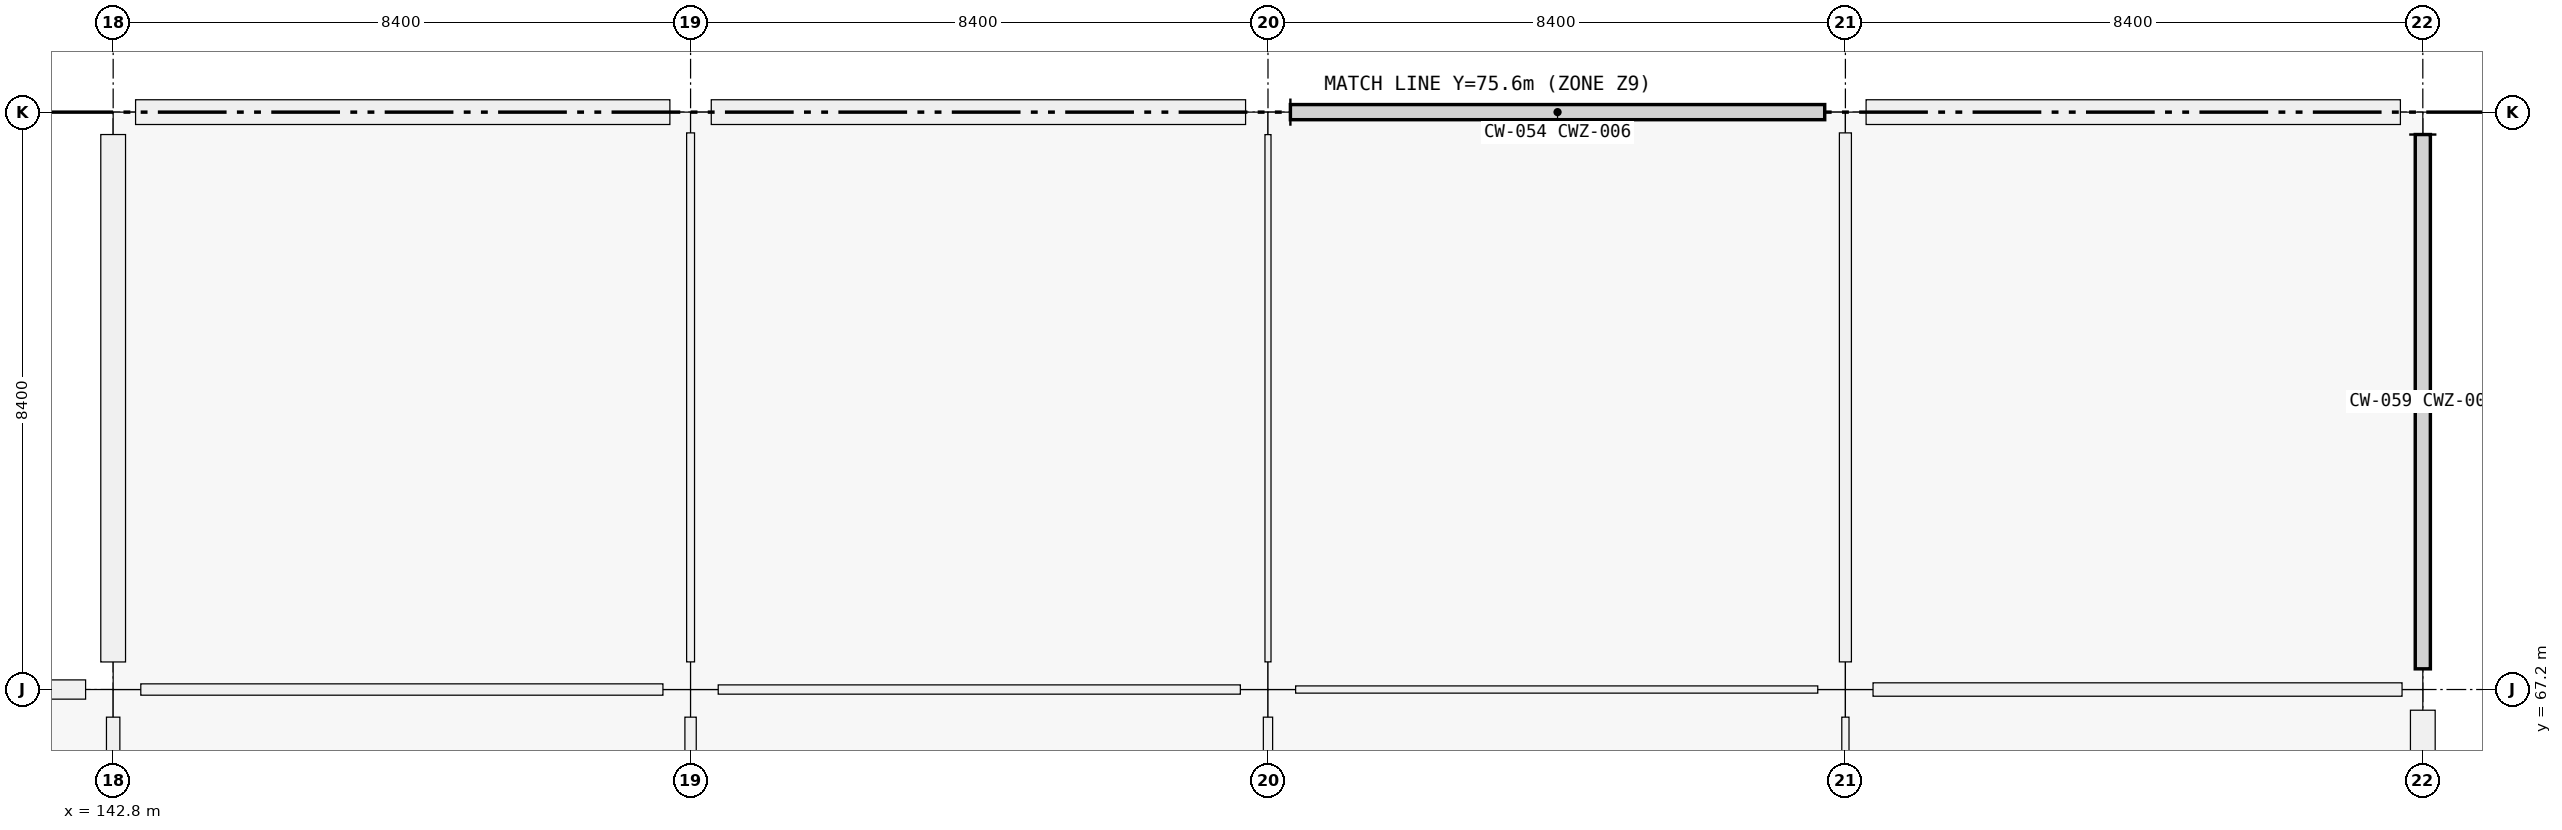
"""IFC4 building model, lengths in metres.
Left out: names, types, materials, properties, quantities, classifications, styles, units other than length and angle.
Written with IfcOpenShell. Run it as: python <this file> out.ifc"""

import sys

from ifc_helpers import new_model, si_unit, direction, frame, frame_2d, origin, origin_2d, place, context, subcontext, project, spatial, rectangle, extrude, element, fill, save


model = new_model("IFC4")
c1 = context("Model", 3, precision=1e-05, world=origin(), true_north=direction((0.0, 1.0)))
c2 = subcontext(c1, "Body", "Model", "MODEL_VIEW")
j1 = project(units=[si_unit("LENGTHUNIT", "METRE"), si_unit("PLANEANGLEUNIT", "RADIAN")], contexts=[c1])
p1 = place(None, origin())
s1 = spatial("IfcSite", under=j1, at=p1, CompositionType="ELEMENT")
p2 = place(p1, origin())
s2 = spatial("IfcBuilding", under=s1, at=p2, CompositionType="ELEMENT")
p3 = place(p2, origin())
s3 = spatial("IfcBuildingStorey", under=s2, at=p3, CompositionType="ELEMENT", Elevation=0.0)
p4 = place(p3, frame((142.8, 67.2, 0.0), z_axis=(0.0, 0.0, 1.0), x_axis=(1.0, 0.0, 0.0)))
e1 = element("IfcColumn", 1, at=p4, inside=s3, PredefinedType="COLUMN", context=c2, shape_type="SweptSolid", body=[
    extrude(rectangle(XDim=0.8, YDim=0.8, at=origin_2d()), origin(), (0.0, 0.0, 1.0), 5.76),
])
p5 = place(p3, frame((142.8, 75.6, 0.0), z_axis=(0.0, 0.0, 1.0), x_axis=(1.0, 0.0, 0.0)))
e2 = element("IfcColumn", 2, at=p5, inside=s3, PredefinedType="COLUMN", context=c2, shape_type="SweptSolid", body=[
    extrude(rectangle(XDim=0.65, YDim=0.65, at=origin_2d()), origin(), (0.0, 0.0, 1.0), 5.76),
])
p6 = place(p3, frame((151.2, 67.2, 0.0), z_axis=(0.0, 0.0, 1.0), x_axis=(1.0, 0.0, 0.0)))
e3 = element("IfcColumn", 3, at=p6, inside=s3, PredefinedType="COLUMN", context=c2, shape_type="SweptSolid", body=[
    extrude(rectangle(XDim=0.8, YDim=0.8, at=origin_2d()), origin(), (0.0, 0.0, 1.0), 5.76),
])
p7 = place(p3, frame((151.2, 75.6, 0.0), z_axis=(0.0, 0.0, 1.0), x_axis=(1.0, 0.0, 0.0)))
e4 = element("IfcColumn", 4, at=p7, inside=s3, PredefinedType="COLUMN", context=c2, shape_type="SweptSolid", body=[
    extrude(rectangle(XDim=0.6, YDim=0.6, at=origin_2d()), origin(), (0.0, 0.0, 1.0), 5.76),
])
p8 = place(p3, frame((159.6, 67.2, 0.0), z_axis=(0.0, 0.0, 1.0), x_axis=(1.0, 0.0, 0.0)))
e5 = element("IfcColumn", 5, at=p8, inside=s3, PredefinedType="COLUMN", context=c2, shape_type="SweptSolid", body=[
    extrude(rectangle(XDim=0.8, YDim=0.8, at=origin_2d()), origin(), (0.0, 0.0, 1.0), 5.76),
])
p9 = place(p3, frame((159.6, 75.6, 0.0), z_axis=(0.0, 0.0, 1.0), x_axis=(1.0, 0.0, 0.0)))
e6 = element("IfcColumn", 6, at=p9, inside=s3, PredefinedType="COLUMN", context=c2, shape_type="SweptSolid", body=[
    extrude(rectangle(XDim=0.65, YDim=0.65, at=origin_2d()), origin(), (0.0, 0.0, 1.0), 5.76),
])
p10 = place(p3, frame((168.0, 67.2, 0.0), z_axis=(0.0, 0.0, 1.0), x_axis=(1.0, 0.0, 0.0)))
e7 = element("IfcColumn", 7, at=p10, inside=s3, PredefinedType="COLUMN", context=c2, shape_type="SweptSolid", body=[
    extrude(rectangle(XDim=0.8, YDim=0.8, at=origin_2d()), origin(), (0.0, 0.0, 1.0), 5.76),
])
for number, where, z_axis, x_axis in (
    (8, (168.0, 75.6, 0.0), (0.0, 0.0, 1.0), (1.0, 0.0, 0.0)),
    (9, (176.4, 67.2, 0.0), (0.0, 0.0, 1.0), (1.0, 0.0, 0.0)),
):
    element("IfcColumn", number, at=place(p3, frame(where, z_axis=z_axis, x_axis=x_axis)), inside=s3, PredefinedType="COLUMN", context=c2, shape_type="SweptSolid", body=[
        extrude(rectangle(XDim=0.6, YDim=0.6, at=origin_2d()), origin(), (0.0, 0.0, 1.0), 5.76),
    ])
p11 = place(p3, frame((176.4, 75.6, 0.0), z_axis=(0.0, 0.0, 1.0), x_axis=(1.0, 0.0, 0.0)))
e10 = element("IfcColumn", 10, at=p11, inside=s3, PredefinedType="COLUMN", context=c2, shape_type="SweptSolid", body=[
    extrude(rectangle(XDim=0.65, YDim=0.65, at=origin_2d()), origin(), (0.0, 0.0, 1.0), 5.76),
])
p12 = place(p3, frame((134.776, 67.2, 0.0), z_axis=(0.0, 0.0, 1.0), x_axis=(1.0, 0.0, 0.0)))
e11 = element("IfcWall", 11, at=p12, inside=s3, PredefinedType="SOLIDWALL", context=c2, shape_type="SweptSolid", body=[
    extrude(rectangle(XDim=7.623, YDim=0.28, at=frame_2d((3.812, 0.0))), origin(), (0.0, 0.0, 1.0), 4.7),
])
p13 = place(p12, frame((2.537, 0.0, 0.9)))
e12 = element("IfcOpeningElement", 12, at=p13, cuts=e11, PredefinedType="OPENING", context=c2, shape_type="SweptSolid", body=[
    extrude(rectangle(XDim=2.55, YDim=1.95, at=frame_2d((1.275, 0.975))), frame((0.0, 0.14, 0.0), z_axis=(0.0, -1.0, 0.0), x_axis=(1.0, 0.0, 0.0)), (0.0, 0.0, 1.0), 0.28),
])
p14 = place(p3, frame((142.8, 67.601, 0.0), z_axis=(0.0, 0.0, 1.0), x_axis=(0.0, 1.0, 0.0)))
e13 = element("IfcWall", 13, at=p14, inside=s3, PredefinedType="SOLIDWALL", context=c2, shape_type="SweptSolid", body=[
    extrude(rectangle(XDim=7.673, YDim=0.36, at=frame_2d((3.836, 0.0))), origin(), (0.0, 0.0, 1.0), 4.7),
])
p15 = place(p14, frame((2.937, 0.0, 0.9)))
e14 = element("IfcOpeningElement", 14, at=p15, cuts=e13, PredefinedType="OPENING", context=c2, shape_type="SweptSolid", body=[
    extrude(rectangle(XDim=1.8, YDim=1.8, at=frame_2d((0.9, 0.9))), frame((0.0, 0.18, 0.0), z_axis=(0.0, -1.0, 0.0), x_axis=(1.0, 0.0, 0.0)), (0.0, 0.0, 1.0), 0.36),
])
p16 = place(p3, frame((143.126, 75.6, 0.0), z_axis=(0.0, 0.0, 1.0), x_axis=(1.0, 0.0, 0.0)))
e15 = element("IfcWall", 15, at=p16, inside=s3, PredefinedType="SOLIDWALL", context=c2, shape_type="SweptSolid", body=[
    extrude(rectangle(XDim=7.773, YDim=0.36, at=frame_2d((3.886, 0.0))), origin(), (0.0, 0.0, 1.0), 4.7),
])
p17 = place(p16, frame((2.837, 0.0, 0.9)))
e16 = element("IfcOpeningElement", 16, at=p17, cuts=e15, PredefinedType="OPENING", context=c2, shape_type="SweptSolid", body=[
    extrude(rectangle(XDim=2.1, YDim=1.8, at=frame_2d((1.05, 0.9))), frame((0.0, 0.18, 0.0), z_axis=(0.0, -1.0, 0.0), x_axis=(1.0, 0.0, 0.0)), (0.0, 0.0, 1.0), 0.36),
])
p18 = place(p3, frame((151.501, 75.6, 0.0), z_axis=(0.0, 0.0, 1.0), x_axis=(1.0, 0.0, 0.0)))
e17 = element("IfcWall", 17, at=p18, inside=s3, PredefinedType="SOLIDWALL", context=c2, shape_type="SweptSolid", body=[
    extrude(rectangle(XDim=7.773, YDim=0.36, at=frame_2d((3.886, 0.0))), origin(), (0.0, 0.0, 1.0), 4.7),
])
p19 = place(p18, frame((2.686, 0.0, 0.9)))
e18 = element("IfcOpeningElement", 18, at=p19, cuts=e17, PredefinedType="OPENING", context=c2, shape_type="SweptSolid", body=[
    extrude(rectangle(XDim=2.4, YDim=1.8, at=frame_2d((1.2, 0.9))), frame((0.0, 0.18, 0.0), z_axis=(0.0, -1.0, 0.0), x_axis=(1.0, 0.0, 0.0)), (0.0, 0.0, 1.0), 0.36),
])
p20 = place(p3, frame((176.4, 66.899, 0.0), z_axis=(0.0, 0.0, 1.0), x_axis=(0.0, -1.0, 0.0)))
e19 = element("IfcWall", 19, at=p20, inside=s3, PredefinedType="SOLIDWALL", context=c2, shape_type="SweptSolid", body=[
    extrude(rectangle(XDim=7.773, YDim=0.36, at=frame_2d((3.886, 0.0))), origin(), (0.0, 0.0, 1.0), 4.7),
])
p21 = place(p20, frame((3.286, 0.0, 0.9)))
e20 = element("IfcOpeningElement", 20, at=p21, cuts=e19, PredefinedType="OPENING", context=c2, shape_type="SweptSolid", body=[
    extrude(rectangle(XDim=1.2, YDim=2.1, at=frame_2d((0.6, 1.05))), frame((0.0, 0.18, 0.0), z_axis=(0.0, -1.0, 0.0), x_axis=(1.0, 0.0, 0.0)), (0.0, 0.0, 1.0), 0.36),
])
p22 = place(p3, frame((168.301, 75.6, 0.0), z_axis=(0.0, 0.0, 1.0), x_axis=(1.0, 0.0, 0.0)))
e21 = element("IfcWall", 21, at=p22, inside=s3, PredefinedType="SOLIDWALL", context=c2, shape_type="SweptSolid", body=[
    extrude(rectangle(XDim=7.773, YDim=0.36, at=frame_2d((3.886, 0.0))), origin(), (0.0, 0.0, 1.0), 4.7),
])
p23 = place(p22, frame((2.386, 0.0, 0.9)))
e22 = element("IfcOpeningElement", 22, at=p23, cuts=e21, PredefinedType="OPENING", context=c2, shape_type="SweptSolid", body=[
    extrude(rectangle(XDim=3.0, YDim=1.2, at=frame_2d((1.5, 0.6))), frame((0.0, 0.18, 0.0), z_axis=(0.0, -1.0, 0.0), x_axis=(1.0, 0.0, 0.0)), (0.0, 0.0, 1.0), 0.36),
])
p24 = place(p3, frame((143.202, 67.2, 0.0), z_axis=(0.0, 0.0, 1.0), x_axis=(1.0, 0.0, 0.0)))
e23 = element("IfcWall", 23, at=p24, inside=s3, PredefinedType="PARTITIONING", context=c2, shape_type="SweptSolid", body=[
    extrude(rectangle(XDim=7.596, YDim=0.165, at=frame_2d((3.798, 0.0))), origin(), (0.0, 0.0, 1.0), 3.66),
])
p25 = place(p24, frame((3.278, 0.0, 0.0)))
e24 = element("IfcOpeningElement", 24, at=p25, cuts=e23, PredefinedType="OPENING", context=c2, shape_type="SweptSolid", body=[
    extrude(rectangle(XDim=1.04, YDim=2.2, at=frame_2d((0.52, 1.1))), frame((0.0, 0.083, 0.0), z_axis=(0.0, -1.0, 0.0), x_axis=(1.0, 0.0, 0.0)), (0.0, 0.0, 1.0), 0.165),
])
p26 = place(p3, frame((151.602, 67.2, 0.0), z_axis=(0.0, 0.0, 1.0), x_axis=(1.0, 0.0, 0.0)))
e25 = element("IfcWall", 25, at=p26, inside=s3, PredefinedType="PARTITIONING", context=c2, shape_type="SweptSolid", body=[
    extrude(rectangle(XDim=7.596, YDim=0.135, at=frame_2d((3.798, 0.0))), origin(), (0.0, 0.0, 1.0), 3.66),
])
p27 = place(p26, frame((3.328, 0.0, 0.0)))
e26 = element("IfcOpeningElement", 26, at=p27, cuts=e25, PredefinedType="OPENING", context=c2, shape_type="SweptSolid", body=[
    extrude(rectangle(XDim=0.94, YDim=2.15, at=frame_2d((0.47, 1.075))), frame((0.0, 0.067, 0.0), z_axis=(0.0, -1.0, 0.0), x_axis=(1.0, 0.0, 0.0)), (0.0, 0.0, 1.0), 0.135),
])
p28 = place(p3, frame((160.002, 67.2, 0.0), z_axis=(0.0, 0.0, 1.0), x_axis=(1.0, 0.0, 0.0)))
e27 = element("IfcWall", 27, at=p28, inside=s3, PredefinedType="PARTITIONING", context=c2, shape_type="SweptSolid", body=[
    extrude(rectangle(XDim=7.596, YDim=0.105, at=frame_2d((3.798, 0.0))), origin(), (0.0, 0.0, 1.0), 3.66),
])
p29 = place(p28, frame((3.273, 0.0, 0.0)))
e28 = element("IfcOpeningElement", 28, at=p29, cuts=e27, PredefinedType="OPENING", context=c2, shape_type="SweptSolid", body=[
    extrude(rectangle(XDim=1.05, YDim=2.12, at=frame_2d((0.525, 1.06))), frame((0.0, 0.052, 0.0), z_axis=(0.0, -1.0, 0.0), x_axis=(1.0, 0.0, 0.0)), (0.0, 0.0, 1.0), 0.105),
])
p30 = place(p3, frame((168.402, 67.2, 0.0), z_axis=(0.0, 0.0, 1.0), x_axis=(1.0, 0.0, 0.0)))
e29 = element("IfcWall", 29, at=p30, inside=s3, PredefinedType="PARTITIONING", context=c2, shape_type="SweptSolid", body=[
    extrude(rectangle(XDim=7.696, YDim=0.195, at=frame_2d((3.848, 0.0))), origin(), (0.0, 0.0, 1.0), 3.66),
])
p31 = place(p30, frame((3.328, 0.0, 0.0)))
e30 = element("IfcOpeningElement", 30, at=p31, cuts=e29, PredefinedType="OPENING", context=c2, shape_type="SweptSolid", body=[
    extrude(rectangle(XDim=1.04, YDim=2.2, at=frame_2d((0.52, 1.1))), frame((0.0, 0.098, 0.0), z_axis=(0.0, -1.0, 0.0), x_axis=(1.0, 0.0, 0.0)), (0.0, 0.0, 1.0), 0.195),
])
p32 = place(p3, frame((142.8, 59.202, 0.0), z_axis=(0.0, 0.0, 1.0), x_axis=(0.0, 1.0, 0.0)))
e31 = element("IfcWall", 31, at=p32, inside=s3, PredefinedType="PARTITIONING", context=c2, shape_type="SweptSolid", body=[
    extrude(rectangle(XDim=7.596, YDim=0.195, at=frame_2d((3.798, 0.0))), origin(), (0.0, 0.0, 1.0), 3.66),
])
p33 = place(p32, frame((3.268, 0.0, 0.0)))
e32 = element("IfcOpeningElement", 32, at=p33, cuts=e31, PredefinedType="OPENING", context=c2, shape_type="SweptSolid", body=[
    extrude(rectangle(XDim=1.06, YDim=2.25, at=frame_2d((0.53, 1.125))), frame((0.0, 0.098, 0.0), z_axis=(0.0, -1.0, 0.0), x_axis=(1.0, 0.0, 0.0)), (0.0, 0.0, 1.0), 0.195),
])
p34 = place(p3, frame((151.2, 59.202, 0.0), z_axis=(0.0, 0.0, 1.0), x_axis=(0.0, 1.0, 0.0)))
e33 = element("IfcWall", 33, at=p34, inside=s3, PredefinedType="PARTITIONING", context=c2, shape_type="SweptSolid", body=[
    extrude(rectangle(XDim=7.596, YDim=0.165, at=frame_2d((3.798, 0.0))), origin(), (0.0, 0.0, 1.0), 3.66),
])
p35 = place(p34, frame((3.318, 0.0, 0.0)))
e34 = element("IfcOpeningElement", 34, at=p35, cuts=e33, PredefinedType="OPENING", context=c2, shape_type="SweptSolid", body=[
    extrude(rectangle(XDim=0.96, YDim=2.18, at=frame_2d((0.48, 1.09))), frame((0.0, 0.083, 0.0), z_axis=(0.0, -1.0, 0.0), x_axis=(1.0, 0.0, 0.0)), (0.0, 0.0, 1.0), 0.165),
])
p36 = place(p3, frame((151.2, 67.602, 0.0), z_axis=(0.0, 0.0, 1.0), x_axis=(0.0, 1.0, 0.0)))
e35 = element("IfcWall", 35, at=p36, inside=s3, PredefinedType="PARTITIONING", context=c2, shape_type="SweptSolid", body=[
    extrude(rectangle(XDim=7.696, YDim=0.115, at=frame_2d((3.848, 0.0))), origin(), (0.0, 0.0, 1.0), 3.66),
])
p37 = place(p36, frame((3.378, 0.0, 0.0)))
e36 = element("IfcOpeningElement", 36, at=p37, cuts=e35, PredefinedType="OPENING", context=c2, shape_type="SweptSolid", body=[
    extrude(rectangle(XDim=0.94, YDim=2.15, at=frame_2d((0.47, 1.075))), frame((0.0, 0.058, 0.0), z_axis=(0.0, -1.0, 0.0), x_axis=(1.0, 0.0, 0.0)), (0.0, 0.0, 1.0), 0.115),
])
p38 = place(p3, frame((159.6, 59.202, 0.0), z_axis=(0.0, 0.0, 1.0), x_axis=(0.0, 1.0, 0.0)))
e37 = element("IfcWall", 37, at=p38, inside=s3, PredefinedType="PARTITIONING", context=c2, shape_type="SweptSolid", body=[
    extrude(rectangle(XDim=7.596, YDim=0.135, at=frame_2d((3.798, 0.0))), origin(), (0.0, 0.0, 1.0), 3.66),
])
p39 = place(p38, frame((3.288, 0.0, 0.0)))
e38 = element("IfcOpeningElement", 38, at=p39, cuts=e37, PredefinedType="OPENING", context=c2, shape_type="SweptSolid", body=[
    extrude(rectangle(XDim=1.02, YDim=2.2, at=frame_2d((0.51, 1.1))), frame((0.0, 0.067, 0.0), z_axis=(0.0, -1.0, 0.0), x_axis=(1.0, 0.0, 0.0)), (0.0, 0.0, 1.0), 0.135),
])
p40 = place(p3, frame((159.6, 67.602, 0.0), z_axis=(0.0, 0.0, 1.0), x_axis=(0.0, 1.0, 0.0)))
e39 = element("IfcWall", 39, at=p40, inside=s3, PredefinedType="PARTITIONING", context=c2, shape_type="SweptSolid", body=[
    extrude(rectangle(XDim=7.671, YDim=0.088, at=frame_2d((3.835, 0.0))), origin(), (0.0, 0.0, 1.0), 3.66),
])
p41 = place(p40, frame((3.331, 0.0, 0.0)))
e40 = element("IfcOpeningElement", 40, at=p41, cuts=e39, PredefinedType="OPENING", context=c2, shape_type="SweptSolid", body=[
    extrude(rectangle(XDim=1.01, YDim=2.12, at=frame_2d((0.505, 1.06))), frame((0.0, 0.044, 0.0), z_axis=(0.0, -1.0, 0.0), x_axis=(1.0, 0.0, 0.0)), (0.0, 0.0, 1.0), 0.088),
])
p42 = place(p3, frame((168.0, 59.202, 0.0), z_axis=(0.0, 0.0, 1.0), x_axis=(0.0, 1.0, 0.0)))
e41 = element("IfcWall", 41, at=p42, inside=s3, PredefinedType="PARTITIONING", context=c2, shape_type="SweptSolid", body=[
    extrude(rectangle(XDim=7.596, YDim=0.105, at=frame_2d((3.798, 0.0))), origin(), (0.0, 0.0, 1.0), 3.66),
])
p43 = place(p42, frame((3.258, 0.0, 0.0)))
e42 = element("IfcOpeningElement", 42, at=p43, cuts=e41, PredefinedType="OPENING", context=c2, shape_type="SweptSolid", body=[
    extrude(rectangle(XDim=1.08, YDim=2.25, at=frame_2d((0.54, 1.125))), frame((0.0, 0.052, 0.0), z_axis=(0.0, -1.0, 0.0), x_axis=(1.0, 0.0, 0.0)), (0.0, 0.0, 1.0), 0.105),
])
p44 = place(p3, frame((168.0, 67.602, 0.0), z_axis=(0.0, 0.0, 1.0), x_axis=(0.0, 1.0, 0.0)))
e43 = element("IfcWall", 43, at=p44, inside=s3, PredefinedType="PARTITIONING", context=c2, shape_type="SweptSolid", body=[
    extrude(rectangle(XDim=7.696, YDim=0.175, at=frame_2d((3.848, 0.0))), origin(), (0.0, 0.0, 1.0), 3.66),
])
p45 = place(p44, frame((3.318, 0.0, 0.0)))
e44 = element("IfcOpeningElement", 44, at=p45, cuts=e43, PredefinedType="OPENING", context=c2, shape_type="SweptSolid", body=[
    extrude(rectangle(XDim=1.06, YDim=2.25, at=frame_2d((0.53, 1.125))), frame((0.0, 0.087, 0.0), z_axis=(0.0, -1.0, 0.0), x_axis=(1.0, 0.0, 0.0)), (0.0, 0.0, 1.0), 0.175),
])
p46 = place(p15, origin())
e45 = element("IfcWindow", 45, at=p46, inside=s3, PartitioningType="SINGLE_PANEL", PredefinedType="WINDOW", context=c2, shape_type="SweptSolid", body=[
    extrude(rectangle(XDim=1.8, YDim=1.8, at=frame_2d((0.9, 0.9))), frame((0.0, 0.03, 0.0), z_axis=(0.0, -1.0, 0.0), x_axis=(1.0, 0.0, 0.0)), (0.0, 0.0, 1.0), 0.06),
])
fill(e14, e45)
p47 = place(p17, origin())
e46 = element("IfcWindow", 46, at=p47, inside=s3, PartitioningType="SINGLE_PANEL", PredefinedType="WINDOW", context=c2, shape_type="SweptSolid", body=[
    extrude(rectangle(XDim=2.1, YDim=1.8, at=frame_2d((1.05, 0.9))), frame((0.0, 0.03, 0.0), z_axis=(0.0, -1.0, 0.0), x_axis=(1.0, 0.0, 0.0)), (0.0, 0.0, 1.0), 0.06),
])
fill(e16, e46)
p48 = place(p19, origin())
e47 = element("IfcWindow", 47, at=p48, inside=s3, PartitioningType="SINGLE_PANEL", PredefinedType="WINDOW", context=c2, shape_type="SweptSolid", body=[
    extrude(rectangle(XDim=2.4, YDim=1.8, at=frame_2d((1.2, 0.9))), frame((0.0, 0.03, 0.0), z_axis=(0.0, -1.0, 0.0), x_axis=(1.0, 0.0, 0.0)), (0.0, 0.0, 1.0), 0.06),
])
fill(e18, e47)
p49 = place(p23, origin())
e48 = element("IfcWindow", 48, at=p49, inside=s3, PartitioningType="SINGLE_PANEL", PredefinedType="WINDOW", context=c2, shape_type="SweptSolid", body=[
    extrude(rectangle(XDim=3.0, YDim=1.2, at=frame_2d((1.5, 0.6))), frame((0.0, 0.03, 0.0), z_axis=(0.0, -1.0, 0.0), x_axis=(1.0, 0.0, 0.0)), (0.0, 0.0, 1.0), 0.06),
])
fill(e22, e48)
p50 = place(p25, origin())
e49 = element("IfcDoor", 49, at=p50, inside=s3, OperationType="SINGLE_SWING_LEFT", PredefinedType="DOOR", context=c2, shape_type="SweptSolid", body=[
    extrude(rectangle(XDim=1.04, YDim=2.2, at=frame_2d((0.52, 1.1))), frame((0.0, 0.025, 0.0), z_axis=(0.0, -1.0, 0.0), x_axis=(1.0, 0.0, 0.0)), (0.0, 0.0, 1.0), 0.05),
])
fill(e24, e49)
p51 = place(p27, origin())
e50 = element("IfcDoor", 50, at=p51, inside=s3, OperationType="SINGLE_SWING_RIGHT", PredefinedType="DOOR", context=c2, shape_type="SweptSolid", body=[
    extrude(rectangle(XDim=0.94, YDim=2.15, at=frame_2d((0.47, 1.075))), frame((0.0, 0.025, 0.0), z_axis=(0.0, -1.0, 0.0), x_axis=(1.0, 0.0, 0.0)), (0.0, 0.0, 1.0), 0.05),
])
fill(e26, e50)
p52 = place(p29, origin())
e51 = element("IfcDoor", 51, at=p52, inside=s3, OperationType="SINGLE_SWING_RIGHT", PredefinedType="DOOR", context=c2, shape_type="SweptSolid", body=[
    extrude(rectangle(XDim=1.05, YDim=2.12, at=frame_2d((0.525, 1.06))), frame((0.0, 0.025, 0.0), z_axis=(0.0, -1.0, 0.0), x_axis=(1.0, 0.0, 0.0)), (0.0, 0.0, 1.0), 0.05),
])
fill(e28, e51)
p53 = place(p31, origin())
e52 = element("IfcDoor", 52, at=p53, inside=s3, OperationType="SINGLE_SWING_RIGHT", PredefinedType="DOOR", context=c2, shape_type="SweptSolid", body=[
    extrude(rectangle(XDim=1.04, YDim=2.2, at=frame_2d((0.52, 1.1))), frame((0.0, 0.025, 0.0), z_axis=(0.0, -1.0, 0.0), x_axis=(1.0, 0.0, 0.0)), (0.0, 0.0, 1.0), 0.05),
])
fill(e30, e52)
p54 = place(p37, origin())
e53 = element("IfcDoor", 53, at=p54, inside=s3, OperationType="SINGLE_SWING_LEFT", PredefinedType="DOOR", context=c2, shape_type="SweptSolid", body=[
    extrude(rectangle(XDim=0.94, YDim=2.15, at=frame_2d((0.47, 1.075))), frame((0.0, 0.025, 0.0), z_axis=(0.0, -1.0, 0.0), x_axis=(1.0, 0.0, 0.0)), (0.0, 0.0, 1.0), 0.05),
])
fill(e36, e53)
p55 = place(p41, origin())
e54 = element("IfcDoor", 54, at=p55, inside=s3, OperationType="SINGLE_SWING_RIGHT", PredefinedType="DOOR", context=c2, shape_type="SweptSolid", body=[
    extrude(rectangle(XDim=1.01, YDim=2.12, at=frame_2d((0.505, 1.06))), frame((0.0, 0.025, 0.0), z_axis=(0.0, -1.0, 0.0), x_axis=(1.0, 0.0, 0.0)), (0.0, 0.0, 1.0), 0.05),
])
fill(e40, e54)
p56 = place(p45, origin())
e55 = element("IfcDoor", 55, at=p56, inside=s3, OperationType="SINGLE_SWING_RIGHT", PredefinedType="DOOR", context=c2, shape_type="SweptSolid", body=[
    extrude(rectangle(XDim=1.06, YDim=2.25, at=frame_2d((0.53, 1.125))), frame((0.0, 0.025, 0.0), z_axis=(0.0, -1.0, 0.0), x_axis=(1.0, 0.0, 0.0)), (0.0, 0.0, 1.0), 0.05),
])
fill(e44, e55)
save(model, sys.argv[1])
